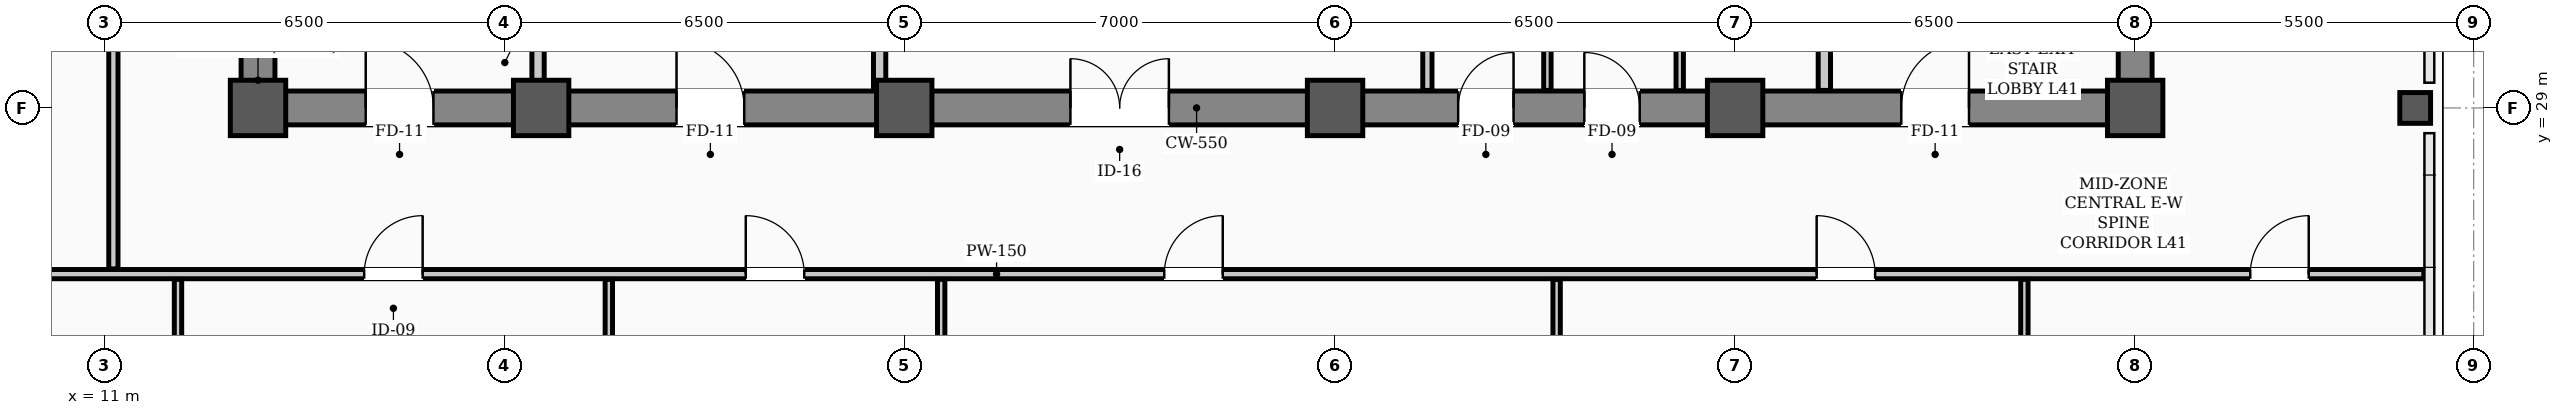
"""IFC4 building model, lengths in metres.
Left out: names, types, materials, properties, quantities, classifications, styles, units other than length and angle.
Written with IfcOpenShell. Run it as: python <this file> out.ifc"""

import sys

from ifc_helpers import new_model, si_unit, direction, frame, frame_2d, origin, origin_2d, place, context, subcontext, project, spatial, rectangle, hollow_rectangle, extrude, element, fill, save


model = new_model("IFC4")
c1 = context("Model", 3, precision=1e-05, world=origin(), true_north=direction((0.0, 1.0)))
c2 = subcontext(c1, "Body", "Model", "MODEL_VIEW")
j1 = project(units=[si_unit("LENGTHUNIT", "METRE"), si_unit("PLANEANGLEUNIT", "RADIAN")], contexts=[c1])
p1 = place(None, origin())
s1 = spatial("IfcSite", under=j1, at=p1, CompositionType="ELEMENT")
p2 = place(p1, origin())
s2 = spatial("IfcBuilding", under=s1, at=p2, CompositionType="ELEMENT")
p3 = place(p2, frame((0.0, 0.0, 165.6)))
s3 = spatial("IfcBuildingStorey", under=s2, at=p3, CompositionType="ELEMENT", Elevation=165.6)
for number, where, z_axis, x_axis in (
    (1, (13.5, 29.0, 0.0), (0.0, 0.0, 1.0), (1.0, 0.0, 0.0)),
    (2, (18.1, 29.0, 0.0), (0.0, 0.0, 1.0), (1.0, 0.0, 0.0)),
    (3, (24.0, 29.0, 0.0), (0.0, 0.0, 1.0), (1.0, 0.0, 0.0)),
    (4, (31.0, 29.0, 0.0), (0.0, 0.0, 1.0), (1.0, 0.0, 0.0)),
    (5, (37.5, 29.0, 0.0), (0.0, 0.0, 1.0), (1.0, 0.0, 0.0)),
    (6, (44.0, 29.0, 0.0), (0.0, 0.0, 1.0), (1.0, 0.0, 0.0)),
):
    element("IfcColumn", number, at=place(p3, frame(where, z_axis=z_axis, x_axis=x_axis)), inside=s3, PredefinedType="COLUMN", context=c2, shape_type="SweptSolid", body=[
        extrude(hollow_rectangle(XDim=0.9, YDim=0.9, WallThickness=0.035, InnerFilletRadius=0.017, OuterFilletRadius=0.052, at=origin_2d()), origin(), (0.0, 0.0, 1.0), 3.9),
    ])
p4 = place(p3, frame((48.55, 29.0, 0.0), z_axis=(0.0, 0.0, 1.0), x_axis=(1.0, 0.0, 0.0)))
e7 = element("IfcColumn", 7, at=p4, inside=s3, PredefinedType="COLUMN", context=c2, shape_type="SweptSolid", body=[
    extrude(hollow_rectangle(XDim=0.5, YDim=0.5, WallThickness=0.024, InnerFilletRadius=0.012, OuterFilletRadius=0.036, at=origin_2d()), origin(), (0.0, 0.0, 1.0), 3.9),
])
p5 = place(p3, frame((13.5, 29.0, 0.0), z_axis=(0.0, 0.0, 1.0), x_axis=(1.0, 0.0, 0.0)))
e8 = element("IfcWall", 8, at=p5, inside=s3, PredefinedType="SHEAR", context=c2, shape_type="SweptSolid", body=[
    extrude(rectangle(XDim=30.5, YDim=0.55, at=frame_2d((15.25, 0.0))), origin(), (0.0, 0.0, 1.0), 3.66),
])
p6 = place(p5, frame((1.75, 0.0, 0.0)))
e9 = element("IfcOpeningElement", 9, at=p6, cuts=e8, PredefinedType="OPENING", context=c2, shape_type="SweptSolid", body=[
    extrude(rectangle(XDim=1.1, YDim=2.08, at=frame_2d((0.55, 1.04))), frame((0.0, 0.285, 0.0), z_axis=(0.0, -1.0, 0.0), x_axis=(1.0, 0.0, 0.0)), (0.0, 0.0, 1.0), 0.57),
])
p7 = place(p5, frame((26.7, 0.0, 0.0)))
e10 = element("IfcOpeningElement", 10, at=p7, cuts=e8, PredefinedType="OPENING", context=c2, shape_type="SweptSolid", body=[
    extrude(rectangle(XDim=1.1, YDim=2.08, at=frame_2d((0.55, 1.04))), frame((0.0, 0.285, 0.0), z_axis=(0.0, -1.0, 0.0), x_axis=(1.0, 0.0, 0.0)), (0.0, 0.0, 1.0), 0.57),
])
p8 = place(p5, frame((6.8, 0.0, 0.0)))
e11 = element("IfcOpeningElement", 11, at=p8, cuts=e8, PredefinedType="OPENING", context=c2, shape_type="SweptSolid", body=[
    extrude(rectangle(XDim=1.1, YDim=2.08, at=frame_2d((0.55, 1.04))), frame((0.0, 0.285, 0.0), z_axis=(0.0, -1.0, 0.0), x_axis=(1.0, 0.0, 0.0)), (0.0, 0.0, 1.0), 0.57),
])
p9 = place(p5, frame((13.2, 0.0, 0.0)))
e12 = element("IfcOpeningElement", 12, at=p9, cuts=e8, PredefinedType="OPENING", context=c2, shape_type="SweptSolid", body=[
    extrude(rectangle(XDim=1.6, YDim=2.08, at=frame_2d((0.8, 1.04))), frame((0.0, 0.285, 0.0), z_axis=(0.0, -1.0, 0.0), x_axis=(1.0, 0.0, 0.0)), (0.0, 0.0, 1.0), 0.57),
])
p10 = place(p5, frame((19.5, 0.0, 0.0)))
e13 = element("IfcOpeningElement", 13, at=p10, cuts=e8, PredefinedType="OPENING", context=c2, shape_type="SweptSolid", body=[
    extrude(rectangle(XDim=0.9, YDim=2.08, at=frame_2d((0.45, 1.04))), frame((0.0, 0.285, 0.0), z_axis=(0.0, -1.0, 0.0), x_axis=(1.0, 0.0, 0.0)), (0.0, 0.0, 1.0), 0.57),
])
p11 = place(p5, frame((21.55, 0.0, 0.0)))
e14 = element("IfcOpeningElement", 14, at=p11, cuts=e8, PredefinedType="OPENING", context=c2, shape_type="SweptSolid", body=[
    extrude(rectangle(XDim=0.9, YDim=2.08, at=frame_2d((0.45, 1.04))), frame((0.0, 0.285, 0.0), z_axis=(0.0, -1.0, 0.0), x_axis=(1.0, 0.0, 0.0)), (0.0, 0.0, 1.0), 0.57),
])
for number, where, z_axis, x_axis in (
    (15, (13.5, 29.35, 0.0), (0.0, 0.0, 1.0), (0.0, 1.0, 0.0)),
    (16, (44.0, 29.35, 0.0), (0.0, 0.0, 1.0), (0.0, 1.0, 0.0)),
):
    element("IfcWall", number, at=place(p3, frame(where, z_axis=z_axis, x_axis=x_axis)), inside=s3, PredefinedType="SHEAR", context=c2, shape_type="SweptSolid", body=[
        extrude(rectangle(XDim=8.6, YDim=0.55, at=frame_2d((4.3, 0.0))), origin(), (0.0, 0.0, 1.0), 3.66),
    ])
p12 = place(p3, frame((2.31, 26.3, 0.0), z_axis=(0.0, 0.0, 1.0), x_axis=(1.0, 0.0, 0.0)))
e17 = element("IfcWall", 17, at=p12, inside=s3, PredefinedType="PARTITIONING", context=c2, shape_type="SweptSolid", body=[
    extrude(rectangle(XDim=46.38, YDim=0.15, at=frame_2d((23.19, 0.0))), origin(), (0.0, 0.0, 1.0), 2.24),
])
p13 = place(p12, frame((12.915, 0.0, 0.0)))
e18 = element("IfcOpeningElement", 18, at=p13, cuts=e17, PredefinedType="OPENING", context=c2, shape_type="SweptSolid", body=[
    extrude(rectangle(XDim=0.95, YDim=2.08, at=frame_2d((0.475, 1.04))), frame((0.0, 0.085, 0.0), z_axis=(0.0, -1.0, 0.0), x_axis=(1.0, 0.0, 0.0)), (0.0, 0.0, 1.0), 0.17),
])
p14 = place(p12, frame((19.115, 0.0, 0.0)))
e19 = element("IfcOpeningElement", 19, at=p14, cuts=e17, PredefinedType="OPENING", context=c2, shape_type="SweptSolid", body=[
    extrude(rectangle(XDim=0.95, YDim=2.08, at=frame_2d((0.475, 1.04))), frame((0.0, 0.085, 0.0), z_axis=(0.0, -1.0, 0.0), x_axis=(1.0, 0.0, 0.0)), (0.0, 0.0, 1.0), 0.17),
])
p15 = place(p12, frame((25.915, 0.0, 0.0)))
e20 = element("IfcOpeningElement", 20, at=p15, cuts=e17, PredefinedType="OPENING", context=c2, shape_type="SweptSolid", body=[
    extrude(rectangle(XDim=0.95, YDim=2.08, at=frame_2d((0.475, 1.04))), frame((0.0, 0.085, 0.0), z_axis=(0.0, -1.0, 0.0), x_axis=(1.0, 0.0, 0.0)), (0.0, 0.0, 1.0), 0.17),
])
p16 = place(p12, frame((36.515, 0.0, 0.0)))
e21 = element("IfcOpeningElement", 21, at=p16, cuts=e17, PredefinedType="OPENING", context=c2, shape_type="SweptSolid", body=[
    extrude(rectangle(XDim=0.95, YDim=2.08, at=frame_2d((0.475, 1.04))), frame((0.0, 0.085, 0.0), z_axis=(0.0, -1.0, 0.0), x_axis=(1.0, 0.0, 0.0)), (0.0, 0.0, 1.0), 0.17),
])
p17 = place(p12, frame((43.56, 0.0, 0.0)))
e22 = element("IfcOpeningElement", 22, at=p17, cuts=e17, PredefinedType="OPENING", context=c2, shape_type="SweptSolid", body=[
    extrude(rectangle(XDim=0.95, YDim=2.08, at=frame_2d((0.475, 1.04))), frame((0.0, 0.085, 0.0), z_axis=(0.0, -1.0, 0.0), x_axis=(1.0, 0.0, 0.0)), (0.0, 0.0, 1.0), 0.17),
])
for number, where, z_axis, x_axis in (
    (23, (18.05, 29.285, 0.0), (0.0, 0.0, 1.0), (0.0, 1.0, 0.0)),
    (24, (38.95, 29.285, 0.0), (0.0, 0.0, 1.0), (0.0, 1.0, 0.0)),
):
    element("IfcWall", number, at=place(p3, frame(where, z_axis=z_axis, x_axis=x_axis)), inside=s3, PredefinedType="STANDARD", context=c2, shape_type="SweptSolid", body=[
        extrude(rectangle(XDim=1.015, YDim=0.2, at=frame_2d((0.508, 0.0))), origin(), (0.0, 0.0, 1.0), 2.24),
    ])
p18 = place(p3, frame((23.6, 29.285, 0.0), z_axis=(0.0, 0.0, 1.0), x_axis=(0.0, 1.0, 0.0)))
e25 = element("IfcWall", 25, at=p18, inside=s3, PredefinedType="STANDARD", context=c2, shape_type="SweptSolid", body=[
    extrude(rectangle(XDim=5.415, YDim=0.2, at=frame_2d((2.708, 0.0))), origin(), (0.0, 0.0, 1.0), 2.24),
])
p19 = place(p3, frame((32.5, 29.285, 0.0), z_axis=(0.0, 0.0, 1.0), x_axis=(0.0, 1.0, 0.0)))
e26 = element("IfcWall", 26, at=p19, inside=s3, PredefinedType="PARTITIONING", context=c2, shape_type="SweptSolid", body=[
    extrude(rectangle(XDim=2.48, YDim=0.15, at=frame_2d((1.24, 0.0))), origin(), (0.0, 0.0, 1.0), 2.24),
])
for number, where, z_axis, x_axis in (
    (27, (36.6, 29.285, 0.0), (0.0, 0.0, 1.0), (0.0, 1.0, 0.0)),
    (28, (34.45, 29.285, 0.0), (0.0, 0.0, 1.0), (0.0, 1.0, 0.0)),
):
    element("IfcWall", number, at=place(p3, frame(where, z_axis=z_axis, x_axis=x_axis)), inside=s3, PredefinedType="PARTITIONING", context=c2, shape_type="SweptSolid", body=[
        extrude(rectangle(XDim=2.48, YDim=0.12, at=frame_2d((1.24, 0.0))), origin(), (0.0, 0.0, 1.0), 2.24),
    ])
p20 = place(p3, frame((11.15, 26.385, 0.0), z_axis=(0.0, 0.0, 1.0), x_axis=(0.0, 1.0, 0.0)))
e29 = element("IfcWall", 29, at=p20, inside=s3, PredefinedType="PARTITIONING", context=c2, shape_type="SweptSolid", body=[
    extrude(rectangle(XDim=13.58, YDim=0.15, at=frame_2d((6.79, 0.0))), origin(), (0.0, 0.0, 1.0), 2.24),
])
p21 = place(p20, frame((6.315, 0.0, 0.0)))
e30 = element("IfcOpeningElement", 30, at=p21, cuts=e29, PredefinedType="OPENING", context=c2, shape_type="SweptSolid", body=[
    extrude(rectangle(XDim=0.95, YDim=2.08, at=frame_2d((0.475, 1.04))), frame((0.0, 0.085, 0.0), z_axis=(0.0, -1.0, 0.0), x_axis=(1.0, 0.0, 0.0)), (0.0, 0.0, 1.0), 0.17),
])
p22 = place(p3, frame((12.2, 16.31, 0.0), z_axis=(0.0, 0.0, 1.0), x_axis=(0.0, 1.0, 0.0)))
e31 = element("IfcWall", 31, at=p22, inside=s3, PredefinedType="PARTITIONING", context=c2, shape_type="SweptSolid", body=[
    extrude(rectangle(XDim=9.905, YDim=0.12, at=frame_2d((4.953, 0.0))), origin(), (0.0, 0.0, 1.0), 2.24),
])
p23 = place(p22, frame((7.915, 0.0, 0.0)))
e32 = element("IfcOpeningElement", 32, at=p23, cuts=e31, PredefinedType="OPENING", context=c2, shape_type="SweptSolid", body=[
    extrude(rectangle(XDim=0.95, YDim=2.08, at=frame_2d((0.475, 1.04))), frame((0.0, 0.07, 0.0), z_axis=(0.0, -1.0, 0.0), x_axis=(1.0, 0.0, 0.0)), (0.0, 0.0, 1.0), 0.14),
])
p24 = place(p3, frame((19.2, 16.31, 0.0), z_axis=(0.0, 0.0, 1.0), x_axis=(0.0, 1.0, 0.0)))
e33 = element("IfcWall", 33, at=p24, inside=s3, PredefinedType="PARTITIONING", context=c2, shape_type="SweptSolid", body=[
    extrude(rectangle(XDim=9.905, YDim=0.12, at=frame_2d((4.953, 0.0))), origin(), (0.0, 0.0, 1.0), 2.24),
])
p25 = place(p3, frame((24.6, 18.07, 0.0), z_axis=(0.0, 0.0, 1.0), x_axis=(0.0, 1.0, 0.0)))
e34 = element("IfcWall", 34, at=p25, inside=s3, PredefinedType="PARTITIONING", context=c2, shape_type="SweptSolid", body=[
    extrude(rectangle(XDim=8.145, YDim=0.12, at=frame_2d((4.073, 0.0))), origin(), (0.0, 0.0, 1.0), 2.24),
])
for number, where, z_axis, x_axis in (
    (35, (34.6, 16.31, 0.0), (0.0, 0.0, 1.0), (0.0, 1.0, 0.0)),
    (36, (42.2, 16.31, 0.0), (0.0, 0.0, 1.0), (0.0, 1.0, 0.0)),
):
    element("IfcWall", number, at=place(p3, frame(where, z_axis=z_axis, x_axis=x_axis)), inside=s3, PredefinedType="PARTITIONING", context=c2, shape_type="SweptSolid", body=[
        extrude(rectangle(XDim=9.905, YDim=0.12, at=frame_2d((4.953, 0.0))), origin(), (0.0, 0.0, 1.0), 2.24),
    ])
p26 = place(p6, origin())
e37 = element("IfcDoor", 37, at=p26, inside=s3, OperationType="SINGLE_SWING_LEFT", PredefinedType="DOOR", context=c2, shape_type="SweptSolid", body=[
    extrude(rectangle(XDim=1.1, YDim=2.08, at=frame_2d((0.55, 1.04))), frame((0.0, 0.025, 0.0), z_axis=(0.0, -1.0, 0.0), x_axis=(1.0, 0.0, 0.0)), (0.0, 0.0, 1.0), 0.05),
])
fill(e9, e37)
p27 = place(p7, origin())
e38 = element("IfcDoor", 38, at=p27, inside=s3, OperationType="SINGLE_SWING_RIGHT", PredefinedType="DOOR", context=c2, shape_type="SweptSolid", body=[
    extrude(rectangle(XDim=1.1, YDim=2.08, at=frame_2d((0.55, 1.04))), frame((0.0, 0.025, 0.0), z_axis=(0.0, -1.0, 0.0), x_axis=(1.0, 0.0, 0.0)), (0.0, 0.0, 1.0), 0.05),
])
fill(e10, e38)
p28 = place(p8, origin())
e39 = element("IfcDoor", 39, at=p28, inside=s3, OperationType="SINGLE_SWING_LEFT", PredefinedType="DOOR", context=c2, shape_type="SweptSolid", body=[
    extrude(rectangle(XDim=1.1, YDim=2.08, at=frame_2d((0.55, 1.04))), frame((0.0, 0.025, 0.0), z_axis=(0.0, -1.0, 0.0), x_axis=(1.0, 0.0, 0.0)), (0.0, 0.0, 1.0), 0.05),
])
fill(e11, e39)
p29 = place(p9, origin())
e40 = element("IfcDoor", 40, at=p29, inside=s3, OperationType="DOUBLE_DOOR_SINGLE_SWING", PredefinedType="DOOR", context=c2, shape_type="SweptSolid", body=[
    extrude(rectangle(XDim=1.6, YDim=2.08, at=frame_2d((0.8, 1.04))), frame((0.0, 0.025, 0.0), z_axis=(0.0, -1.0, 0.0), x_axis=(1.0, 0.0, 0.0)), (0.0, 0.0, 1.0), 0.05),
])
fill(e12, e40)
p30 = place(p10, origin())
e41 = element("IfcDoor", 41, at=p30, inside=s3, OperationType="SINGLE_SWING_RIGHT", PredefinedType="DOOR", context=c2, shape_type="SweptSolid", body=[
    extrude(rectangle(XDim=0.9, YDim=2.08, at=frame_2d((0.45, 1.04))), frame((0.0, 0.025, 0.0), z_axis=(0.0, -1.0, 0.0), x_axis=(1.0, 0.0, 0.0)), (0.0, 0.0, 1.0), 0.05),
])
fill(e13, e41)
p31 = place(p11, origin())
e42 = element("IfcDoor", 42, at=p31, inside=s3, OperationType="SINGLE_SWING_LEFT", PredefinedType="DOOR", context=c2, shape_type="SweptSolid", body=[
    extrude(rectangle(XDim=0.9, YDim=2.08, at=frame_2d((0.45, 1.04))), frame((0.0, 0.025, 0.0), z_axis=(0.0, -1.0, 0.0), x_axis=(1.0, 0.0, 0.0)), (0.0, 0.0, 1.0), 0.05),
])
fill(e14, e42)
p32 = place(p13, origin())
e43 = element("IfcDoor", 43, at=p32, inside=s3, OperationType="SINGLE_SWING_RIGHT", PredefinedType="DOOR", context=c2, shape_type="SweptSolid", body=[
    extrude(rectangle(XDim=0.95, YDim=2.08, at=frame_2d((0.475, 1.04))), frame((0.0, 0.025, 0.0), z_axis=(0.0, -1.0, 0.0), x_axis=(1.0, 0.0, 0.0)), (0.0, 0.0, 1.0), 0.05),
])
fill(e18, e43)
p33 = place(p14, origin())
e44 = element("IfcDoor", 44, at=p33, inside=s3, OperationType="SINGLE_SWING_LEFT", PredefinedType="DOOR", context=c2, shape_type="SweptSolid", body=[
    extrude(rectangle(XDim=0.95, YDim=2.08, at=frame_2d((0.475, 1.04))), frame((0.0, 0.025, 0.0), z_axis=(0.0, -1.0, 0.0), x_axis=(1.0, 0.0, 0.0)), (0.0, 0.0, 1.0), 0.05),
])
fill(e19, e44)
p34 = place(p15, origin())
e45 = element("IfcDoor", 45, at=p34, inside=s3, OperationType="SINGLE_SWING_RIGHT", PredefinedType="DOOR", context=c2, shape_type="SweptSolid", body=[
    extrude(rectangle(XDim=0.95, YDim=2.08, at=frame_2d((0.475, 1.04))), frame((0.0, 0.025, 0.0), z_axis=(0.0, -1.0, 0.0), x_axis=(1.0, 0.0, 0.0)), (0.0, 0.0, 1.0), 0.05),
])
fill(e20, e45)
p35 = place(p16, origin())
e46 = element("IfcDoor", 46, at=p35, inside=s3, OperationType="SINGLE_SWING_LEFT", PredefinedType="DOOR", context=c2, shape_type="SweptSolid", body=[
    extrude(rectangle(XDim=0.95, YDim=2.08, at=frame_2d((0.475, 1.04))), frame((0.0, 0.025, 0.0), z_axis=(0.0, -1.0, 0.0), x_axis=(1.0, 0.0, 0.0)), (0.0, 0.0, 1.0), 0.05),
])
fill(e21, e46)
p36 = place(p17, origin())
e47 = element("IfcDoor", 47, at=p36, inside=s3, OperationType="SINGLE_SWING_RIGHT", PredefinedType="DOOR", context=c2, shape_type="SweptSolid", body=[
    extrude(rectangle(XDim=0.95, YDim=2.08, at=frame_2d((0.475, 1.04))), frame((0.0, 0.025, 0.0), z_axis=(0.0, -1.0, 0.0), x_axis=(1.0, 0.0, 0.0)), (0.0, 0.0, 1.0), 0.05),
])
fill(e22, e47)
save(model, sys.argv[1])
